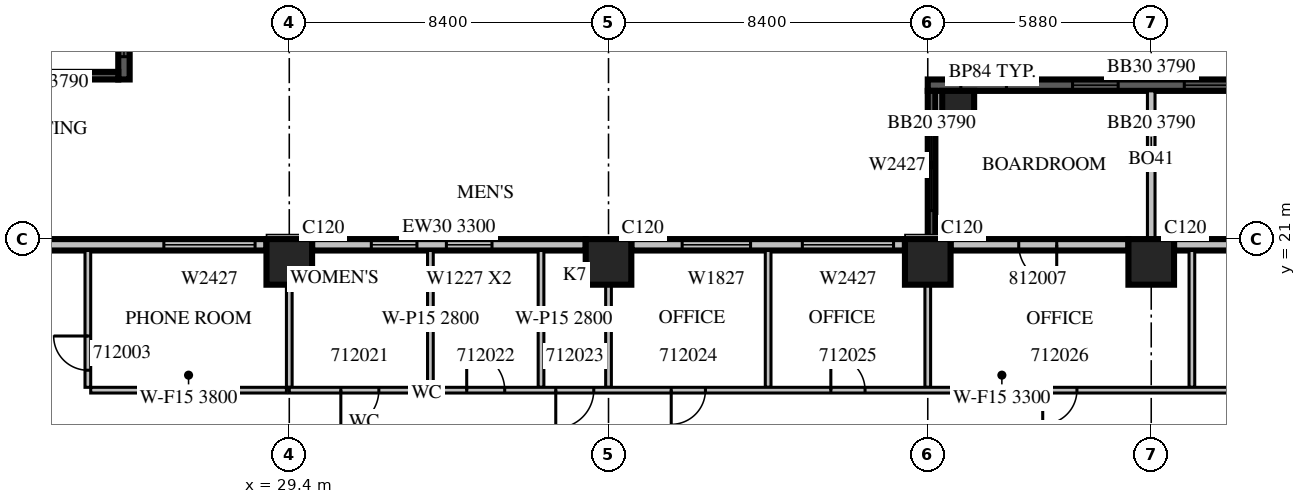
"""IFC4 building model, lengths in metres.
Left out: names, types, materials, properties, quantities, classifications, styles, units other than length and angle.
Written with IfcOpenShell. Run it as: python <this file> out.ifc"""

import sys

from ifc_helpers import new_model, si_unit, direction, frame, frame_2d, origin, origin_2d, place, context, subcontext, project, spatial, rectangle, extrude, source, transform, mapped, element, fill, save


model = new_model("IFC4")
c1 = context("Model", 3, precision=1e-05, world=origin(), true_north=direction((0.0, 1.0)))
c2 = subcontext(c1, "Body", "Model", "MODEL_VIEW")
j1 = project(units=[si_unit("LENGTHUNIT", "METRE"), si_unit("PLANEANGLEUNIT", "RADIAN")], contexts=[c1])
p1 = place(None, origin())
s1 = spatial("IfcSite", under=j1, at=p1, CompositionType="ELEMENT")
p2 = place(p1, origin())
s2 = spatial("IfcBuilding", under=s1, at=p2, CompositionType="ELEMENT")
p3 = place(p2, frame((0.0, 0.0, 61.5)))
s3 = spatial("IfcBuildingStorey", under=s2, at=p3, CompositionType="ELEMENT", Elevation=61.5)
m1 = source(origin(), c2, "Body", "SweptSolid", [
    extrude(rectangle(XDim=1.2, YDim=1.2, at=origin_2d()), origin(), (0.0, 0.0, 1.0), 4.2),
])
for number, where, z_axis, x_axis in (
    (1, (29.4, 20.4, 0.0), (0.0, 0.0, 1.0), (1.0, 0.0, 0.0)),
    (2, (37.8, 20.4, 0.0), (0.0, 0.0, 1.0), (1.0, 0.0, 0.0)),
    (3, (46.2, 20.4, 0.0), (0.0, 0.0, 1.0), (1.0, 0.0, 0.0)),
    (4, (52.08, 20.4, 0.0), (0.0, 0.0, 1.0), (1.0, 0.0, 0.0)),
):
    element("IfcColumn", number, at=place(p3, frame(where, z_axis=z_axis, x_axis=x_axis)), inside=s3, PredefinedType="COLUMN", context=c2, shape_type="MappedRepresentation", body=[
        mapped(m1, transform((0.0, 0.0, 0.0), scale=1.0)),
    ])
m2 = source(origin(), c2, "Body", "SweptSolid", [
    extrude(rectangle(XDim=0.84, YDim=0.84, at=origin_2d()), origin(), (0.0, 0.0, 1.0), 4.2),
])
p4 = place(p3, frame((47.0, 24.48, 0.0), z_axis=(0.0, 0.0, 1.0), x_axis=(1.0, 0.0, 0.0)))
e5 = element("IfcColumn", 5, at=p4, inside=s3, PredefinedType="COLUMN", context=c2, shape_type="MappedRepresentation", body=[
    mapped(m2, transform((0.0, 0.0, 0.0), scale=1.0)),
])
m3 = source(origin(), c2, "Body", "SweptSolid", [
    extrude(rectangle(XDim=11.76, YDim=0.3, at=frame_2d((5.88, 0.0))), origin(), (0.0, 0.0, 1.0), 3.79),
])
p5 = place(p3, frame((57.96, 25.05, 0.0), z_axis=(0.0, 0.0, 1.0), x_axis=(-1.0, 0.0, 0.0)))
e6 = element("IfcWall", 6, at=p5, inside=s3, PredefinedType="SOLIDWALL", context=c2, shape_type="MappedRepresentation", body=[
    mapped(m3, transform((0.0, 0.0, 0.0), scale=1.0)),
])
m4 = source(origin(), c2, "Body", "SweptSolid", [
    extrude(rectangle(XDim=1.2, YDim=2.7, at=frame_2d((0.6, 1.35))), frame((0.0, 0.16, 0.0), z_axis=(0.0, -1.0, 0.0), x_axis=(1.0, 0.0, 0.0)), (0.0, 0.0, 1.0), 0.32),
])
p6 = place(p5, frame((0.87, 0.0, 0.6)))
e7 = element("IfcOpeningElement", 7, at=p6, cuts=e6, PredefinedType="OPENING", context=c2, shape_type="MappedRepresentation", body=[
    mapped(m4, transform((0.0, 0.0, 0.0), scale=1.0)),
])
p7 = place(p5, frame((3.81, 0.0, 0.6)))
e8 = element("IfcOpeningElement", 8, at=p7, cuts=e6, PredefinedType="OPENING", context=c2, shape_type="MappedRepresentation", body=[
    mapped(m4, transform((0.0, 0.0, 0.0), scale=1.0)),
])
p8 = place(p5, frame((6.75, 0.0, 0.6)))
e9 = element("IfcOpeningElement", 9, at=p8, cuts=e6, PredefinedType="OPENING", context=c2, shape_type="MappedRepresentation", body=[
    mapped(m4, transform((0.0, 0.0, 0.0), scale=1.0)),
])
p9 = place(p5, frame((9.69, 0.0, 0.6)))
e10 = element("IfcOpeningElement", 10, at=p9, cuts=e6, PredefinedType="OPENING", context=c2, shape_type="MappedRepresentation", body=[
    mapped(m4, transform((0.0, 0.0, 0.0), scale=1.0)),
])
m5 = source(origin(), c2, "Body", "SweptSolid", [
    extrude(rectangle(XDim=3.9, YDim=0.2, at=frame_2d((1.95, 0.0))), origin(), (0.0, 0.0, 1.0), 3.79),
])
p10 = place(p3, frame((52.08, 21.0, 0.0), z_axis=(0.0, 0.0, 1.0), x_axis=(0.0, 1.0, 0.0)))
e11 = element("IfcWall", 11, at=p10, inside=s3, PredefinedType="SOLIDWALL", context=c2, shape_type="MappedRepresentation", body=[
    mapped(m5, transform((0.0, 0.0, 0.0), scale=1.0)),
])
m6 = source(origin(), c2, "Body", "SweptSolid", [
    extrude(rectangle(XDim=3.9, YDim=0.2, at=frame_2d((1.95, 0.0))), origin(), (0.0, 0.0, 1.0), 3.79),
])
p11 = place(p3, frame((46.3, 21.0, 0.0), z_axis=(0.0, 0.0, 1.0), x_axis=(0.0, 1.0, 0.0)))
e12 = element("IfcWall", 12, at=p11, inside=s3, PredefinedType="SOLIDWALL", context=c2, shape_type="MappedRepresentation", body=[
    mapped(m6, transform((0.0, 0.0, 0.0), scale=1.0)),
])
m7 = source(origin(), c2, "Body", "SweptSolid", [
    extrude(rectangle(XDim=2.4, YDim=2.7, at=frame_2d((1.2, 1.35))), frame((0.0, 0.11, 0.0), z_axis=(0.0, -1.0, 0.0), x_axis=(1.0, 0.0, 0.0)), (0.0, 0.0, 1.0), 0.22),
])
p12 = place(p11, frame((0.75, 0.0, 0.6)))
e13 = element("IfcOpeningElement", 13, at=p12, cuts=e12, PredefinedType="OPENING", context=c2, shape_type="MappedRepresentation", body=[
    mapped(m7, transform((0.0, 0.0, 0.0), scale=1.0)),
])
m8 = source(origin(), c2, "Body", "SweptSolid", [
    extrude(rectangle(XDim=4.68, YDim=0.3, at=frame_2d((2.34, 0.0))), origin(), (0.0, 0.0, 1.0), 3.8),
])
p13 = place(p3, frame((57.36, 20.85, 0.0), z_axis=(0.0, 0.0, 1.0), x_axis=(-1.0, 0.0, 0.0)))
e14 = element("IfcWall", 14, at=p13, inside=s3, PredefinedType="STANDARD", context=c2, shape_type="MappedRepresentation", body=[
    mapped(m8, transform((0.0, 0.0, 0.0), scale=1.0)),
])
m9 = source(origin(), c2, "Body", "SweptSolid", [
    extrude(rectangle(XDim=1.0, YDim=2.1, at=frame_2d((0.5, 1.05))), frame((0.0, 0.16, 0.0), z_axis=(0.0, -1.0, 0.0), x_axis=(1.0, 0.0, 0.0)), (0.0, 0.0, 1.0), 0.32),
])
p14 = place(p13, frame((1.793, 0.0, 0.0)))
e15 = element("IfcOpeningElement", 15, at=p14, cuts=e14, PredefinedType="OPENING", context=c2, shape_type="MappedRepresentation", body=[
    mapped(m9, transform((0.0, 0.0, 0.0), scale=1.0)),
])
p15 = place(p3, frame((51.48, 20.85, 0.0), z_axis=(0.0, 0.0, 1.0), x_axis=(-1.0, 0.0, 0.0)))
e16 = element("IfcWall", 16, at=p15, inside=s3, PredefinedType="STANDARD", context=c2, shape_type="MappedRepresentation", body=[
    mapped(m8, transform((0.0, 0.0, 0.0), scale=1.0)),
])
p16 = place(p15, frame((1.887, 0.0, 0.0)))
e17 = element("IfcOpeningElement", 17, at=p16, cuts=e16, PredefinedType="OPENING", context=c2, shape_type="MappedRepresentation", body=[
    mapped(m9, transform((0.0, 0.0, 0.0), scale=1.0)),
])
m10 = source(origin(), c2, "Body", "SweptSolid", [
    extrude(rectangle(XDim=7.2, YDim=0.3, at=frame_2d((3.6, 0.0))), origin(), (0.0, 0.0, 1.0), 3.8),
])
p17 = place(p3, frame((45.6, 20.85, 0.0), z_axis=(0.0, 0.0, 1.0), x_axis=(-1.0, 0.0, 0.0)))
e18 = element("IfcWall", 18, at=p17, inside=s3, PredefinedType="STANDARD", context=c2, shape_type="MappedRepresentation", body=[
    mapped(m10, transform((0.0, 0.0, 0.0), scale=1.0)),
])
m11 = source(origin(), c2, "Body", "SweptSolid", [
    extrude(rectangle(XDim=2.4, YDim=2.7, at=frame_2d((1.2, 1.35))), frame((0.0, 0.16, 0.0), z_axis=(0.0, -1.0, 0.0), x_axis=(1.0, 0.0, 0.0)), (0.0, 0.0, 1.0), 0.32),
])
p18 = place(p17, frame((0.3, 0.0, 0.6)))
e19 = element("IfcOpeningElement", 19, at=p18, cuts=e18, PredefinedType="OPENING", context=c2, shape_type="MappedRepresentation", body=[
    mapped(m11, transform((0.0, 0.0, 0.0), scale=1.0)),
])
m12 = source(origin(), c2, "Body", "SweptSolid", [
    extrude(rectangle(XDim=1.8, YDim=2.7, at=frame_2d((0.9, 1.35))), frame((0.0, 0.16, 0.0), z_axis=(0.0, -1.0, 0.0), x_axis=(1.0, 0.0, 0.0)), (0.0, 0.0, 1.0), 0.32),
])
p19 = place(p17, frame((4.062, 0.0, 0.6)))
e20 = element("IfcOpeningElement", 20, at=p19, cuts=e18, PredefinedType="OPENING", context=c2, shape_type="MappedRepresentation", body=[
    mapped(m12, transform((0.0, 0.0, 0.0), scale=1.0)),
])
m13 = source(origin(), c2, "Body", "SweptSolid", [
    extrude(rectangle(XDim=7.2, YDim=0.3, at=frame_2d((3.6, 0.0))), origin(), (0.0, 0.0, 1.0), 3.3),
])
p20 = place(p3, frame((37.2, 20.85, 0.0), z_axis=(0.0, 0.0, 1.0), x_axis=(-1.0, 0.0, 0.0)))
e21 = element("IfcWall", 21, at=p20, inside=s3, PredefinedType="STANDARD", context=c2, shape_type="MappedRepresentation", body=[
    mapped(m13, transform((0.0, 0.0, 0.0), scale=1.0)),
])
p21 = place(p20, frame((2.466, 0.0, 0.6)))
e22 = element("IfcOpeningElement", 22, at=p21, cuts=e21, PredefinedType="OPENING", context=c2, shape_type="MappedRepresentation", body=[
    mapped(m4, transform((0.0, 0.0, 0.0), scale=1.0)),
])
p22 = place(p20, frame((4.441, 0.0, 0.6)))
e23 = element("IfcOpeningElement", 23, at=p22, cuts=e21, PredefinedType="OPENING", context=c2, shape_type="MappedRepresentation", body=[
    mapped(m4, transform((0.0, 0.0, 0.0), scale=1.0)),
])
m14 = source(origin(), c2, "Body", "SweptSolid", [
    extrude(rectangle(XDim=6.6, YDim=0.3, at=frame_2d((3.3, 0.0))), origin(), (0.0, 0.0, 1.0), 3.8),
])
p23 = place(p3, frame((28.8, 20.85, 0.0), z_axis=(0.0, 0.0, 1.0), x_axis=(-1.0, 0.0, 0.0)))
e24 = element("IfcWall", 24, at=p23, inside=s3, PredefinedType="STANDARD", context=c2, shape_type="MappedRepresentation", body=[
    mapped(m14, transform((0.0, 0.0, 0.0), scale=1.0)),
])
p24 = place(p23, frame((0.3, 0.0, 0.6)))
e25 = element("IfcOpeningElement", 25, at=p24, cuts=e24, PredefinedType="OPENING", context=c2, shape_type="MappedRepresentation", body=[
    mapped(m11, transform((0.0, 0.0, 0.0), scale=1.0)),
])
m15 = source(origin(), c2, "Body", "SweptSolid", [
    extrude(rectangle(XDim=4.2, YDim=0.3, at=frame_2d((2.1, 0.0))), origin(), (0.0, 0.0, 1.0), 3.79),
])
p25 = place(p3, frame((25.05, 25.2, 0.0), z_axis=(0.0, 0.0, 1.0), x_axis=(0.0, 1.0, 0.0)))
e26 = element("IfcWall", 26, at=p25, inside=s3, PredefinedType="SOLIDWALL", context=c2, shape_type="MappedRepresentation", body=[
    mapped(m15, transform((0.0, 0.0, 0.0), scale=1.0)),
])
m16 = source(origin(), c2, "Body", "SweptSolid", [
    extrude(rectangle(XDim=3.0, YDim=2.7, at=frame_2d((1.5, 1.35))), frame((0.0, 0.16, 0.0), z_axis=(0.0, -1.0, 0.0), x_axis=(1.0, 0.0, 0.0)), (0.0, 0.0, 1.0), 0.32),
])
p26 = place(p25, frame((0.6, 0.0, 0.6)))
e27 = element("IfcOpeningElement", 27, at=p26, cuts=e26, PredefinedType="OPENING", context=c2, shape_type="MappedRepresentation", body=[
    mapped(m16, transform((0.0, 0.0, 0.0), scale=1.0)),
])
p27 = place(p3, frame((21.0, 25.3, 0.0), z_axis=(0.0, 0.0, 1.0), x_axis=(1.0, 0.0, 0.0)))
e28 = element("IfcWall", 28, at=p27, inside=s3, PredefinedType="SOLIDWALL", context=c2, shape_type="MappedRepresentation", body=[
    mapped(m6, transform((0.0, 0.0, 0.0), scale=1.0)),
])
p28 = place(p27, frame((0.75, 0.0, 0.6)))
e29 = element("IfcOpeningElement", 29, at=p28, cuts=e28, PredefinedType="OPENING", context=c2, shape_type="MappedRepresentation", body=[
    mapped(m7, transform((0.0, 0.0, 0.0), scale=1.0)),
])
m17 = source(origin(), c2, "Body", "SweptSolid", [
    extrude(rectangle(XDim=3.6, YDim=0.15, at=frame_2d((1.8, 0.0))), origin(), (0.0, 0.0, 1.0), 3.8),
])
p29 = place(p3, frame((24.1, 20.7, 0.0), z_axis=(0.0, 0.0, 1.0), x_axis=(0.0, -1.0, 0.0)))
e30 = element("IfcWall", 30, at=p29, inside=s3, PredefinedType="PARTITIONING", context=c2, shape_type="MappedRepresentation", body=[
    mapped(m17, transform((0.0, 0.0, 0.0), scale=1.0)),
])
m18 = source(origin(), c2, "Body", "SweptSolid", [
    extrude(rectangle(XDim=0.9, YDim=2.1, at=frame_2d((0.45, 1.05))), frame((0.0, 0.085, 0.0), z_axis=(0.0, -1.0, 0.0), x_axis=(1.0, 0.0, 0.0)), (0.0, 0.0, 1.0), 0.17),
])
p30 = place(p29, frame((2.25, 0.0, 0.0)))
e31 = element("IfcOpeningElement", 31, at=p30, cuts=e30, PredefinedType="OPENING", context=c2, shape_type="MappedRepresentation", body=[
    mapped(m18, transform((0.0, 0.0, 0.0), scale=1.0)),
])
m19 = source(origin(), c2, "Body", "SweptSolid", [
    extrude(rectangle(XDim=5.15, YDim=0.15, at=frame_2d((2.575, 0.0))), origin(), (0.0, 0.0, 1.0), 3.8),
])
p31 = place(p3, frame((24.175, 17.025, 0.0), z_axis=(0.0, 0.0, 1.0), x_axis=(1.0, 0.0, 0.0)))
e32 = element("IfcWall", 32, at=p31, inside=s3, PredefinedType="PARTITIONING", context=c2, shape_type="MappedRepresentation", body=[
    mapped(m19, transform((0.0, 0.0, 0.0), scale=1.0)),
])
m20 = source(origin(), c2, "Body", "SweptSolid", [
    extrude(rectangle(XDim=2.701, YDim=0.15, at=frame_2d((1.351, 0.0))), origin(), (0.0, 0.0, 1.0), 3.8),
])
p32 = place(p3, frame((29.4, 17.1, 0.0), z_axis=(0.0, 0.0, 1.0), x_axis=(0.0, 1.0, 0.0)))
e33 = element("IfcWall", 33, at=p32, inside=s3, PredefinedType="PARTITIONING", context=c2, shape_type="MappedRepresentation", body=[
    mapped(m20, transform((0.0, 0.0, 0.0), scale=1.0)),
])
m21 = source(origin(), c2, "Body", "SweptSolid", [
    extrude(rectangle(XDim=3.6, YDim=0.15, at=frame_2d((1.8, 0.0))), origin(), (0.0, 0.0, 1.0), 2.8),
])
for number, where, z_axis, x_axis in (
    (34, (33.113, 20.7, 0.0), (0.0, 0.0, 1.0), (0.0, -1.0, 0.0)),
    (35, (36.024, 20.7, 0.0), (0.0, 0.0, 1.0), (0.0, -1.0, 0.0)),
):
    element("IfcWall", number, at=place(p3, frame(where, z_axis=z_axis, x_axis=x_axis)), inside=s3, PredefinedType="PARTITIONING", context=c2, shape_type="MappedRepresentation", body=[
        mapped(m21, transform((0.0, 0.0, 0.0), scale=1.0)),
    ])
for number, where, z_axis, x_axis in (
    (36, (42.0, 20.7, 0.0), (0.0, 0.0, 1.0), (0.0, -1.0, 0.0)),
    (37, (53.15, 20.7, 0.0), (0.0, 0.0, 1.0), (0.0, -1.0, 0.0)),
):
    element("IfcWall", number, at=place(p3, frame(where, z_axis=z_axis, x_axis=x_axis)), inside=s3, PredefinedType="PARTITIONING", context=c2, shape_type="MappedRepresentation", body=[
        mapped(m17, transform((0.0, 0.0, 0.0), scale=1.0)),
    ])
for number, where, z_axis, x_axis in (
    (38, (37.8, 17.1, 0.0), (0.0, 0.0, 1.0), (0.0, 1.0, 0.0)),
    (39, (46.2, 17.1, 0.0), (0.0, 0.0, 1.0), (0.0, 1.0, 0.0)),
):
    element("IfcWall", number, at=place(p3, frame(where, z_axis=z_axis, x_axis=x_axis)), inside=s3, PredefinedType="PARTITIONING", context=c2, shape_type="MappedRepresentation", body=[
        mapped(m20, transform((0.0, 0.0, 0.0), scale=1.0)),
    ])
m22 = source(origin(), c2, "Body", "SweptSolid", [
    extrude(rectangle(XDim=37.5, YDim=0.15, at=frame_2d((18.75, 0.0))), origin(), (0.0, 0.0, 1.0), 3.3),
])
p33 = place(p3, frame((29.4, 17.025, 0.0), z_axis=(0.0, 0.0, 1.0), x_axis=(1.0, 0.0, 0.0)))
e40 = element("IfcWall", 40, at=p33, inside=s3, PredefinedType="PARTITIONING", context=c2, shape_type="MappedRepresentation", body=[
    mapped(m22, transform((0.0, 0.0, 0.0), scale=1.0)),
])
m23 = source(origin(), c2, "Body", "SweptSolid", [
    extrude(rectangle(XDim=1.0, YDim=2.1, at=frame_2d((0.5, 1.05))), frame((0.0, 0.085, 0.0), z_axis=(0.0, -1.0, 0.0), x_axis=(1.0, 0.0, 0.0)), (0.0, 0.0, 1.0), 0.17),
])
p34 = place(p33, frame((1.357, 0.0, 0.0)))
e41 = element("IfcOpeningElement", 41, at=p34, cuts=e40, PredefinedType="OPENING", context=c2, shape_type="MappedRepresentation", body=[
    mapped(m23, transform((0.0, 0.0, 0.0), scale=1.0)),
])
p35 = place(p33, frame((4.669, 0.0, 0.0)))
e42 = element("IfcOpeningElement", 42, at=p35, cuts=e40, PredefinedType="OPENING", context=c2, shape_type="MappedRepresentation", body=[
    mapped(m23, transform((0.0, 0.0, 0.0), scale=1.0)),
])
p36 = place(p33, frame((7.012, 0.0, 0.0)))
e43 = element("IfcOpeningElement", 43, at=p36, cuts=e40, PredefinedType="OPENING", context=c2, shape_type="MappedRepresentation", body=[
    mapped(m23, transform((0.0, 0.0, 0.0), scale=1.0)),
])
p37 = place(p33, frame((10.05, 0.0, 0.0)))
e44 = element("IfcOpeningElement", 44, at=p37, cuts=e40, PredefinedType="OPENING", context=c2, shape_type="MappedRepresentation", body=[
    mapped(m18, transform((0.0, 0.0, 0.0), scale=1.0)),
])
p38 = place(p33, frame((14.25, 0.0, 0.0)))
e45 = element("IfcOpeningElement", 45, at=p38, cuts=e40, PredefinedType="OPENING", context=c2, shape_type="MappedRepresentation", body=[
    mapped(m18, transform((0.0, 0.0, 0.0), scale=1.0)),
])
p39 = place(p33, frame((19.825, 0.0, 0.0)))
e46 = element("IfcOpeningElement", 46, at=p39, cuts=e40, PredefinedType="OPENING", context=c2, shape_type="MappedRepresentation", body=[
    mapped(m18, transform((0.0, 0.0, 0.0), scale=1.0)),
])
p40 = place(p33, frame((26.738, 0.0, 0.0)))
e47 = element("IfcOpeningElement", 47, at=p40, cuts=e40, PredefinedType="OPENING", context=c2, shape_type="MappedRepresentation", body=[
    mapped(m18, transform((0.0, 0.0, 0.0), scale=1.0)),
])
p41 = place(p33, frame((33.65, 0.0, 0.0)))
e48 = element("IfcOpeningElement", 48, at=p41, cuts=e40, PredefinedType="OPENING", context=c2, shape_type="MappedRepresentation", body=[
    mapped(m18, transform((0.0, 0.0, 0.0), scale=1.0)),
])
m24 = source(origin(), c2, "Body", "SweptSolid", [
    extrude(rectangle(XDim=1.2, YDim=2.7, at=frame_2d((0.6, 1.35))), frame((0.0, 0.03, 0.0), z_axis=(0.0, -1.0, 0.0), x_axis=(1.0, 0.0, 0.0)), (0.0, 0.0, 1.0), 0.06),
])
p42 = place(p7, origin())
e49 = element("IfcWindow", 49, at=p42, inside=s3, PartitioningType="SINGLE_PANEL", PredefinedType="WINDOW", context=c2, shape_type="MappedRepresentation", body=[
    mapped(m24, transform((0.0, 0.0, 0.0), scale=1.0)),
])
fill(e8, e49)
p43 = place(p8, origin())
e50 = element("IfcWindow", 50, at=p43, inside=s3, PartitioningType="SINGLE_PANEL", PredefinedType="WINDOW", context=c2, shape_type="MappedRepresentation", body=[
    mapped(m24, transform((0.0, 0.0, 0.0), scale=1.0)),
])
fill(e9, e50)
p44 = place(p9, origin())
e51 = element("IfcWindow", 51, at=p44, inside=s3, PartitioningType="SINGLE_PANEL", PredefinedType="WINDOW", context=c2, shape_type="MappedRepresentation", body=[
    mapped(m24, transform((0.0, 0.0, 0.0), scale=1.0)),
])
fill(e10, e51)
m25 = source(origin(), c2, "Body", "SweptSolid", [
    extrude(rectangle(XDim=2.4, YDim=2.7, at=frame_2d((1.2, 1.35))), frame((0.0, 0.03, 0.0), z_axis=(0.0, -1.0, 0.0), x_axis=(1.0, 0.0, 0.0)), (0.0, 0.0, 1.0), 0.06),
])
p45 = place(p12, origin())
e52 = element("IfcWindow", 52, at=p45, inside=s3, PartitioningType="SINGLE_PANEL", PredefinedType="WINDOW", context=c2, shape_type="MappedRepresentation", body=[
    mapped(m25, transform((0.0, 0.0, 0.0), scale=1.0)),
])
fill(e13, e52)
p46 = place(p18, origin())
e53 = element("IfcWindow", 53, at=p46, inside=s3, PartitioningType="SINGLE_PANEL", PredefinedType="WINDOW", context=c2, shape_type="MappedRepresentation", body=[
    mapped(m25, transform((0.0, 0.0, 0.0), scale=1.0)),
])
fill(e19, e53)
p47 = place(p21, origin())
e54 = element("IfcWindow", 54, at=p47, inside=s3, PartitioningType="SINGLE_PANEL", PredefinedType="WINDOW", context=c2, shape_type="MappedRepresentation", body=[
    mapped(m24, transform((0.0, 0.0, 0.0), scale=1.0)),
])
fill(e22, e54)
p48 = place(p22, origin())
e55 = element("IfcWindow", 55, at=p48, inside=s3, PartitioningType="SINGLE_PANEL", PredefinedType="WINDOW", context=c2, shape_type="MappedRepresentation", body=[
    mapped(m24, transform((0.0, 0.0, 0.0), scale=1.0)),
])
fill(e23, e55)
p49 = place(p24, origin())
e56 = element("IfcWindow", 56, at=p49, inside=s3, PartitioningType="SINGLE_PANEL", PredefinedType="WINDOW", context=c2, shape_type="MappedRepresentation", body=[
    mapped(m25, transform((0.0, 0.0, 0.0), scale=1.0)),
])
fill(e25, e56)
m26 = source(origin(), c2, "Body", "SweptSolid", [
    extrude(rectangle(XDim=1.8, YDim=2.7, at=frame_2d((0.9, 1.35))), frame((0.0, 0.03, 0.0), z_axis=(0.0, -1.0, 0.0), x_axis=(1.0, 0.0, 0.0)), (0.0, 0.0, 1.0), 0.06),
])
p50 = place(p19, origin())
e57 = element("IfcWindow", 57, at=p50, inside=s3, PartitioningType="SINGLE_PANEL", PredefinedType="WINDOW", context=c2, shape_type="MappedRepresentation", body=[
    mapped(m26, transform((0.0, 0.0, 0.0), scale=1.0)),
])
fill(e20, e57)
m27 = source(origin(), c2, "Body", "SweptSolid", [
    extrude(rectangle(XDim=3.0, YDim=2.7, at=frame_2d((1.5, 1.35))), frame((0.0, 0.03, 0.0), z_axis=(0.0, -1.0, 0.0), x_axis=(1.0, 0.0, 0.0)), (0.0, 0.0, 1.0), 0.06),
])
p51 = place(p26, origin())
e58 = element("IfcWindow", 58, at=p51, inside=s3, PartitioningType="SINGLE_PANEL", PredefinedType="WINDOW", context=c2, shape_type="MappedRepresentation", body=[
    mapped(m27, transform((0.0, 0.0, 0.0), scale=1.0)),
])
fill(e27, e58)
p52 = place(p28, origin())
e59 = element("IfcWindow", 59, at=p52, inside=s3, PartitioningType="SINGLE_PANEL", PredefinedType="WINDOW", context=c2, shape_type="MappedRepresentation", body=[
    mapped(m25, transform((0.0, 0.0, 0.0), scale=1.0)),
])
fill(e29, e59)
m28 = source(origin(), c2, "Body", "SweptSolid", [
    extrude(rectangle(XDim=0.9, YDim=2.1, at=frame_2d((0.45, 1.05))), frame((0.0, 0.025, 0.0), z_axis=(0.0, -1.0, 0.0), x_axis=(1.0, 0.0, 0.0)), (0.0, 0.0, 1.0), 0.05),
])
p53 = place(p30, origin())
e60 = element("IfcDoor", 60, at=p53, inside=s3, OperationType="SINGLE_SWING_RIGHT", PredefinedType="DOOR", context=c2, shape_type="MappedRepresentation", body=[
    mapped(m28, transform((0.0, 0.0, 0.0), scale=1.0)),
])
fill(e31, e60)
m29 = source(origin(), c2, "Body", "SweptSolid", [
    extrude(rectangle(XDim=1.0, YDim=2.1, at=frame_2d((0.5, 1.05))), frame((0.0, 0.025, 0.0), z_axis=(0.0, -1.0, 0.0), x_axis=(1.0, 0.0, 0.0)), (0.0, 0.0, 1.0), 0.05),
])
p54 = place(p34, origin())
e61 = element("IfcDoor", 61, at=p54, inside=s3, OperationType="SINGLE_SWING_RIGHT", PredefinedType="DOOR", context=c2, shape_type="MappedRepresentation", body=[
    mapped(m29, transform((0.0, 0.0, 0.0), scale=1.0)),
])
fill(e41, e61)
p55 = place(p35, origin())
e62 = element("IfcDoor", 62, at=p55, inside=s3, OperationType="SINGLE_SWING_LEFT", PredefinedType="DOOR", context=c2, shape_type="MappedRepresentation", body=[
    mapped(m29, transform((0.0, 0.0, 0.0), scale=1.0)),
])
fill(e42, e62)
p56 = place(p36, origin())
e63 = element("IfcDoor", 63, at=p56, inside=s3, OperationType="SINGLE_SWING_RIGHT", PredefinedType="DOOR", context=c2, shape_type="MappedRepresentation", body=[
    mapped(m29, transform((0.0, 0.0, 0.0), scale=1.0)),
])
fill(e43, e63)
p57 = place(p37, origin())
e64 = element("IfcDoor", 64, at=p57, inside=s3, OperationType="SINGLE_SWING_RIGHT", PredefinedType="DOOR", context=c2, shape_type="MappedRepresentation", body=[
    mapped(m28, transform((0.0, 0.0, 0.0), scale=1.0)),
])
fill(e44, e64)
p58 = place(p38, origin())
e65 = element("IfcDoor", 65, at=p58, inside=s3, OperationType="SINGLE_SWING_LEFT", PredefinedType="DOOR", context=c2, shape_type="MappedRepresentation", body=[
    mapped(m28, transform((0.0, 0.0, 0.0), scale=1.0)),
])
fill(e45, e65)
p59 = place(p39, origin())
e66 = element("IfcDoor", 66, at=p59, inside=s3, OperationType="SINGLE_SWING_RIGHT", PredefinedType="DOOR", context=c2, shape_type="MappedRepresentation", body=[
    mapped(m28, transform((0.0, 0.0, 0.0), scale=1.0)),
])
fill(e46, e66)
p60 = place(p16, origin())
e67 = element("IfcDoor", 67, at=p60, inside=s3, OperationType="SINGLE_SWING_LEFT", PredefinedType="DOOR", context=c2, shape_type="MappedRepresentation", body=[
    mapped(m29, transform((0.0, 0.0, 0.0), scale=1.0)),
])
fill(e17, e67)
save(model, sys.argv[1])
